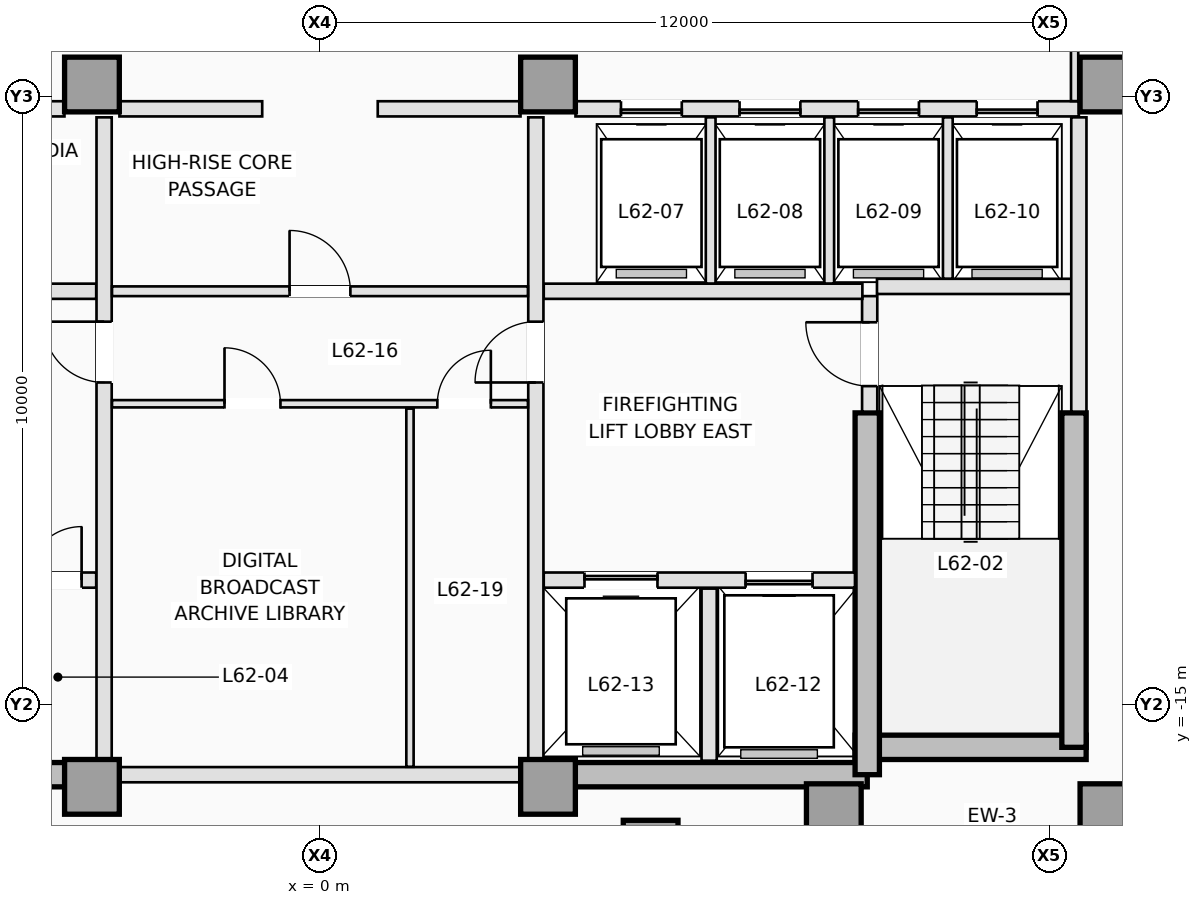
"""IFC4 building model, lengths in metres.
Left out: names, types, materials, properties, quantities, classifications, styles, units other than length and angle.
Written with IfcOpenShell. Run it as: python <this file> out.ifc"""

import sys

from ifc_helpers import new_model, si_unit, direction, frame, frame_2d, origin, origin_2d, place, context, subcontext, project, spatial, rectangle, extrude, element, fill, save


model = new_model("IFC4")
c1 = context("Model", 3, precision=1e-05, world=origin(), true_north=direction((0.0, 1.0)))
c2 = subcontext(c1, "Body", "Model", "MODEL_VIEW")
j1 = project(units=[si_unit("LENGTHUNIT", "METRE"), si_unit("PLANEANGLEUNIT", "RADIAN")], contexts=[c1])
p1 = place(None, origin())
s1 = spatial("IfcSite", under=j1, at=p1, CompositionType="ELEMENT")
p2 = place(p1, origin())
s2 = spatial("IfcBuilding", under=s1, at=p2, CompositionType="ELEMENT")
p3 = place(p2, frame((0.0, 0.0, 225.4)))
s3 = spatial("IfcBuildingStorey", under=s2, at=p3, CompositionType="ELEMENT", Elevation=225.4)
for number, where, z_axis, x_axis in (
    (1, (-9.0, -16.15, 0.0), (0.0, 0.0, 1.0), (1.0, 0.0, 0.0)),
    (2, (3.75, -16.15, 0.0), (0.0, 0.0, 1.0), (1.0, 0.0, 0.0)),
):
    element("IfcWall", number, at=place(p3, frame(where, z_axis=z_axis, x_axis=x_axis)), inside=s3, PredefinedType="SHEAR", context=c2, shape_type="SweptSolid", body=[
        extrude(rectangle(XDim=5.25, YDim=0.4, at=frame_2d((2.625, 0.0))), origin(), (0.0, 0.0, 1.0), 3.5),
    ])
p4 = place(p3, frame((8.8, -15.7, 0.0), z_axis=(0.0, 0.0, 1.0), x_axis=(1.0, 0.0, 0.0)))
e3 = element("IfcWall", 3, at=p4, inside=s3, PredefinedType="SHEAR", context=c2, shape_type="SweptSolid", body=[
    extrude(rectangle(XDim=3.8, YDim=0.4, at=frame_2d((1.9, 0.0))), origin(), (0.0, 0.0, 1.0), 3.5),
])
p5 = place(p3, frame((12.4, -15.7, 0.0), z_axis=(0.0, 0.0, 1.0), x_axis=(0.0, 1.0, 0.0)))
e4 = element("IfcWall", 4, at=p5, inside=s3, PredefinedType="SHEAR", context=c2, shape_type="SweptSolid", body=[
    extrude(rectangle(XDim=5.5, YDim=0.4, at=frame_2d((2.75, 0.0))), origin(), (0.0, 0.0, 1.0), 3.5),
])
p6 = place(p3, frame((9.0, -16.15, 0.0), z_axis=(0.0, 0.0, 1.0), x_axis=(0.0, 1.0, 0.0)))
e5 = element("IfcWall", 5, at=p6, inside=s3, PredefinedType="SHEAR", context=c2, shape_type="SweptSolid", body=[
    extrude(rectangle(XDim=5.95, YDim=0.4, at=frame_2d((2.975, 0.0))), origin(), (0.0, 0.0, 1.0), 3.5),
])
for number, where, z_axis, x_axis in (
    (6, (-3.75, -16.35, 0.0), (0.0, 0.0, 1.0), (1.0, 0.0, 0.0)),
    (7, (3.75, -16.35, 0.0), (0.0, 0.0, 1.0), (1.0, 0.0, 0.0)),
    (8, (8.45, -16.75, 0.0), (0.0, 0.0, 1.0), (1.0, 0.0, 0.0)),
    (9, (12.95, -16.75, 0.0), (0.0, 0.0, 1.0), (1.0, 0.0, 0.0)),
    (10, (-3.75, -4.8, 0.0), (0.0, 0.0, 1.0), (1.0, 0.0, 0.0)),
    (11, (3.75, -4.8, 0.0), (0.0, 0.0, 1.0), (1.0, 0.0, 0.0)),
    (12, (12.95, -4.8, 0.0), (0.0, 0.0, 1.0), (1.0, 0.0, 0.0)),
    (13, (5.438, -17.35, 0.0), (0.0, 0.0, 1.0), (0.0, 1.0, 0.0)),
):
    element("IfcColumn", number, at=place(p3, frame(where, z_axis=z_axis, x_axis=x_axis)), inside=s3, PredefinedType="COLUMN", context=c2, shape_type="SweptSolid", body=[
        extrude(rectangle(XDim=0.9, YDim=0.9, at=origin_2d()), origin(), (0.0, 0.0, 1.0), 3.5),
    ])
p7 = place(p3, frame((9.04, -10.18, 0.0), z_axis=(0.0, 0.0, 1.0), x_axis=(0.0, 1.0, 0.0)))
e14 = element("IfcWall", 14, at=p7, inside=s3, PredefinedType="PARTITIONING", context=c2, shape_type="SweptSolid", body=[
    extrude(rectangle(XDim=1.9, YDim=0.25, at=frame_2d((0.95, 0.0))), origin(), (0.0, 0.0, 1.0), 3.25),
])
p8 = place(p7, frame((0.42, 0.0, 0.0)))
e15 = element("IfcOpeningElement", 15, at=p8, cuts=e14, PredefinedType="OPENING", context=c2, shape_type="SweptSolid", body=[
    extrude(rectangle(XDim=1.05, YDim=2.15, at=frame_2d((0.525, 1.075))), frame((0.0, 0.135, 0.0), z_axis=(0.0, -1.0, 0.0), x_axis=(1.0, 0.0, 0.0)), (0.0, 0.0, 1.0), 0.27),
])
p9 = place(p3, frame((9.16, -8.12, 0.0), z_axis=(0.0, 0.0, 1.0), x_axis=(1.0, 0.0, 0.0)))
e16 = element("IfcWall", 16, at=p9, inside=s3, PredefinedType="PARTITIONING", context=c2, shape_type="SweptSolid", body=[
    extrude(rectangle(XDim=3.22, YDim=0.25, at=frame_2d((1.61, 0.0))), origin(), (0.0, 0.0, 1.0), 3.25),
])
p10 = place(p3, frame((12.48, -10.18, 0.0), z_axis=(0.0, 0.0, 1.0), x_axis=(0.0, 1.0, 0.0)))
e17 = element("IfcWall", 17, at=p10, inside=s3, PredefinedType="PARTITIONING", context=c2, shape_type="SweptSolid", body=[
    extrude(rectangle(XDim=4.84, YDim=0.25, at=frame_2d((2.42, 0.0))), origin(), (0.0, 0.0, 1.0), 3.25),
])
p11 = place(p3, frame((-8.798, -12.95, 0.0), z_axis=(0.0, 0.0, 1.0), x_axis=(1.0, 0.0, 0.0)))
e18 = element("IfcWall", 18, at=p11, inside=s3, PredefinedType="PARTITIONING", context=c2, shape_type="SweptSolid", body=[
    extrude(rectangle(XDim=5.118, YDim=0.25, at=frame_2d((2.559, 0.0))), origin(), (0.0, 0.0, 1.0), 3.25),
])
p12 = place(p11, frame((0.698, 0.0, 0.0)))
e19 = element("IfcOpeningElement", 19, at=p12, cuts=e18, PredefinedType="OPENING", context=c2, shape_type="SweptSolid", body=[
    extrude(rectangle(XDim=1.1, YDim=2.15, at=frame_2d((0.55, 1.075))), frame((0.0, 0.135, 0.0), z_axis=(0.0, -1.0, 0.0), x_axis=(1.0, 0.0, 0.0)), (0.0, 0.0, 1.0), 0.27),
])
p13 = place(p11, frame((2.598, 0.0, 0.0)))
e20 = element("IfcOpeningElement", 20, at=p13, cuts=e18, PredefinedType="OPENING", context=c2, shape_type="SweptSolid", body=[
    extrude(rectangle(XDim=0.88, YDim=2.1, at=frame_2d((0.44, 1.05))), frame((0.0, 0.135, 0.0), z_axis=(0.0, -1.0, 0.0), x_axis=(1.0, 0.0, 0.0)), (0.0, 0.0, 1.0), 0.27),
])
p14 = place(p11, frame((3.998, 0.0, 0.0)))
e21 = element("IfcOpeningElement", 21, at=p14, cuts=e18, PredefinedType="OPENING", context=c2, shape_type="SweptSolid", body=[
    extrude(rectangle(XDim=0.88, YDim=2.1, at=frame_2d((0.44, 1.05))), frame((0.0, 0.135, 0.0), z_axis=(0.0, -1.0, 0.0), x_axis=(1.0, 0.0, 0.0)), (0.0, 0.0, 1.0), 0.27),
])
p15 = place(p3, frame((3.68, -12.95, 0.0), z_axis=(0.0, 0.0, 1.0), x_axis=(1.0, 0.0, 0.0)))
e22 = element("IfcWall", 22, at=p15, inside=s3, PredefinedType="PARTITIONING", context=c2, shape_type="SweptSolid", body=[
    extrude(rectangle(XDim=5.118, YDim=0.25, at=frame_2d((2.559, 0.0))), origin(), (0.0, 0.0, 1.0), 3.25),
])
p16 = place(p15, frame((3.32, 0.0, 0.0)))
e23 = element("IfcOpeningElement", 23, at=p16, cuts=e22, PredefinedType="OPENING", context=c2, shape_type="SweptSolid", body=[
    extrude(rectangle(XDim=1.1, YDim=2.15, at=frame_2d((0.55, 1.075))), frame((0.0, 0.135, 0.0), z_axis=(0.0, -1.0, 0.0), x_axis=(1.0, 0.0, 0.0)), (0.0, 0.0, 1.0), 0.27),
])
p17 = place(p15, frame((0.67, 0.0, 0.0)))
e24 = element("IfcOpeningElement", 24, at=p17, cuts=e22, PredefinedType="OPENING", context=c2, shape_type="SweptSolid", body=[
    extrude(rectangle(XDim=1.2, YDim=2.15, at=frame_2d((0.6, 1.075))), frame((0.0, 0.135, 0.0), z_axis=(0.0, -1.0, 0.0), x_axis=(1.0, 0.0, 0.0)), (0.0, 0.0, 1.0), 0.27),
])
p18 = place(p3, frame((6.4, -15.92, 0.0), z_axis=(0.0, 0.0, 1.0), x_axis=(0.0, 1.0, 0.0)))
e25 = element("IfcWall", 25, at=p18, inside=s3, PredefinedType="PARTITIONING", context=c2, shape_type="SweptSolid", body=[
    extrude(rectangle(XDim=2.83, YDim=0.25, at=frame_2d((1.415, 0.0))), origin(), (0.0, 0.0, 1.0), 3.25),
])
for number, where, z_axis, x_axis in (
    (26, (-8.92, -8.2, 0.0), (0.0, 0.0, 1.0), (1.0, 0.0, 0.0)),
    (27, (3.68, -8.2, 0.0), (0.0, 0.0, 1.0), (1.0, 0.0, 0.0)),
):
    element("IfcWall", number, at=place(p3, frame(where, z_axis=z_axis, x_axis=x_axis)), inside=s3, PredefinedType="PARTITIONING", context=c2, shape_type="SweptSolid", body=[
        extrude(rectangle(XDim=5.24, YDim=0.25, at=frame_2d((2.62, 0.0))), origin(), (0.0, 0.0, 1.0), 3.25),
    ])
p19 = place(p3, frame((-3.55, -15.898, 0.0), z_axis=(0.0, 0.0, 1.0), x_axis=(0.0, 1.0, 0.0)))
e28 = element("IfcWall", 28, at=p19, inside=s3, PredefinedType="PARTITIONING", context=c2, shape_type="SweptSolid", body=[
    extrude(rectangle(XDim=10.558, YDim=0.25, at=frame_2d((5.279, 0.0))), origin(), (0.0, 0.0, 1.0), 3.25),
])
p20 = place(p19, frame((6.198, 0.0, 0.0)))
e29 = element("IfcOpeningElement", 29, at=p20, cuts=e28, PredefinedType="OPENING", context=c2, shape_type="SweptSolid", body=[
    extrude(rectangle(XDim=1.0, YDim=2.15, at=frame_2d((0.5, 1.075))), frame((0.0, 0.135, 0.0), z_axis=(0.0, -1.0, 0.0), x_axis=(1.0, 0.0, 0.0)), (0.0, 0.0, 1.0), 0.27),
])
p21 = place(p3, frame((3.55, -15.898, 0.0), z_axis=(0.0, 0.0, 1.0), x_axis=(0.0, 1.0, 0.0)))
e30 = element("IfcWall", 30, at=p21, inside=s3, PredefinedType="PARTITIONING", context=c2, shape_type="SweptSolid", body=[
    extrude(rectangle(XDim=10.558, YDim=0.25, at=frame_2d((5.279, 0.0))), origin(), (0.0, 0.0, 1.0), 3.25),
])
p22 = place(p21, frame((6.198, 0.0, 0.0)))
e31 = element("IfcOpeningElement", 31, at=p22, cuts=e30, PredefinedType="OPENING", context=c2, shape_type="SweptSolid", body=[
    extrude(rectangle(XDim=1.0, YDim=2.15, at=frame_2d((0.5, 1.075))), frame((0.0, 0.135, 0.0), z_axis=(0.0, -1.0, 0.0), x_axis=(1.0, 0.0, 0.0)), (0.0, 0.0, 1.0), 0.27),
])
p23 = place(p3, frame((-12.48, -5.2, 0.0), z_axis=(0.0, 0.0, 1.0), x_axis=(1.0, 0.0, 0.0)))
e32 = element("IfcWall", 32, at=p23, inside=s3, PredefinedType="PARTITIONING", context=c2, shape_type="SweptSolid", body=[
    extrude(rectangle(XDim=8.278, YDim=0.25, at=frame_2d((4.139, 0.0))), origin(), (0.0, 0.0, 1.0), 3.25),
])
p24 = place(p23, frame((3.05, 0.0, 0.0)))
e33 = element("IfcOpeningElement", 33, at=p24, cuts=e32, PredefinedType="OPENING", context=c2, shape_type="SweptSolid", body=[
    extrude(rectangle(XDim=0.92, YDim=2.12, at=frame_2d((0.46, 1.06))), frame((0.0, 0.135, 0.0), z_axis=(0.0, -1.0, 0.0), x_axis=(1.0, 0.0, 0.0)), (0.0, 0.0, 1.0), 0.27),
])
p25 = place(p23, frame((6.15, 0.0, 0.0)))
e34 = element("IfcOpeningElement", 34, at=p25, cuts=e32, PredefinedType="OPENING", context=c2, shape_type="SweptSolid", body=[
    extrude(rectangle(XDim=0.92, YDim=2.12, at=frame_2d((0.46, 1.06))), frame((0.0, 0.135, 0.0), z_axis=(0.0, -1.0, 0.0), x_axis=(1.0, 0.0, 0.0)), (0.0, 0.0, 1.0), 0.27),
])
p26 = place(p3, frame((4.202, -5.2, 0.0), z_axis=(0.0, 0.0, 1.0), x_axis=(1.0, 0.0, 0.0)))
e35 = element("IfcWall", 35, at=p26, inside=s3, PredefinedType="PARTITIONING", context=c2, shape_type="SweptSolid", body=[
    extrude(rectangle(XDim=8.278, YDim=0.25, at=frame_2d((4.139, 0.0))), origin(), (0.0, 0.0, 1.0), 3.25),
])
p27 = place(p26, frame((0.748, 0.0, 0.0)))
e36 = element("IfcOpeningElement", 36, at=p27, cuts=e35, PredefinedType="OPENING", context=c2, shape_type="SweptSolid", body=[
    extrude(rectangle(XDim=1.0, YDim=2.15, at=frame_2d((0.5, 1.075))), frame((0.0, 0.135, 0.0), z_axis=(0.0, -1.0, 0.0), x_axis=(1.0, 0.0, 0.0)), (0.0, 0.0, 1.0), 0.27),
])
p28 = place(p26, frame((2.698, 0.0, 0.0)))
e37 = element("IfcOpeningElement", 37, at=p28, cuts=e35, PredefinedType="OPENING", context=c2, shape_type="SweptSolid", body=[
    extrude(rectangle(XDim=1.0, YDim=2.15, at=frame_2d((0.5, 1.075))), frame((0.0, 0.135, 0.0), z_axis=(0.0, -1.0, 0.0), x_axis=(1.0, 0.0, 0.0)), (0.0, 0.0, 1.0), 0.27),
])
p29 = place(p26, frame((4.648, 0.0, 0.0)))
e38 = element("IfcOpeningElement", 38, at=p29, cuts=e35, PredefinedType="OPENING", context=c2, shape_type="SweptSolid", body=[
    extrude(rectangle(XDim=1.0, YDim=2.15, at=frame_2d((0.5, 1.075))), frame((0.0, 0.135, 0.0), z_axis=(0.0, -1.0, 0.0), x_axis=(1.0, 0.0, 0.0)), (0.0, 0.0, 1.0), 0.27),
])
p30 = place(p26, frame((6.598, 0.0, 0.0)))
e39 = element("IfcOpeningElement", 39, at=p30, cuts=e35, PredefinedType="OPENING", context=c2, shape_type="SweptSolid", body=[
    extrude(rectangle(XDim=1.0, YDim=2.15, at=frame_2d((0.5, 1.075))), frame((0.0, 0.135, 0.0), z_axis=(0.0, -1.0, 0.0), x_axis=(1.0, 0.0, 0.0)), (0.0, 0.0, 1.0), 0.27),
])
for number, where, z_axis, x_axis in (
    (40, (-3.298, -5.2, 0.0), (0.0, 0.0, 1.0), (1.0, 0.0, 0.0)),
    (41, (0.95, -5.2, 0.0), (0.0, 0.0, 1.0), (1.0, 0.0, 0.0)),
):
    element("IfcWall", number, at=place(p3, frame(where, z_axis=z_axis, x_axis=x_axis)), inside=s3, PredefinedType="PARTITIONING", context=c2, shape_type="SweptSolid", body=[
        extrude(rectangle(XDim=2.348, YDim=0.25, at=frame_2d((1.174, 0.0))), origin(), (0.0, 0.0, 1.0), 3.25),
    ])
for number, where, z_axis, x_axis in (
    (42, (6.425, -8.073, 0.0), (0.0, 0.0, 1.0), (0.0, 1.0, 0.0)),
    (43, (8.375, -8.073, 0.0), (0.0, 0.0, 1.0), (0.0, 1.0, 0.0)),
):
    element("IfcWall", number, at=place(p3, frame(where, z_axis=z_axis, x_axis=x_axis)), inside=s3, PredefinedType="PARTITIONING", context=c2, shape_type="SweptSolid", body=[
        extrude(rectangle(XDim=2.733, YDim=0.16, at=frame_2d((1.366, 0.0))), origin(), (0.0, 0.0, 1.0), 3.25),
    ])
p31 = place(p3, frame((10.325, -7.993, 0.0), z_axis=(0.0, 0.0, 1.0), x_axis=(0.0, 1.0, 0.0)))
e44 = element("IfcWall", 44, at=p31, inside=s3, PredefinedType="PARTITIONING", context=c2, shape_type="SweptSolid", body=[
    extrude(rectangle(XDim=2.653, YDim=0.16, at=frame_2d((1.326, 0.0))), origin(), (0.0, 0.0, 1.0), 3.25),
])
p32 = place(p3, frame((-3.298, -16.15, 0.0), z_axis=(0.0, 0.0, 1.0), x_axis=(1.0, 0.0, 0.0)))
e45 = element("IfcWall", 45, at=p32, inside=s3, PredefinedType="PARTITIONING", context=c2, shape_type="SweptSolid", body=[
    extrude(rectangle(XDim=6.596, YDim=0.25, at=frame_2d((3.298, 0.0))), origin(), (0.0, 0.0, 1.0), 2.45),
])
p33 = place(p3, frame((-3.42, -8.2, 0.0), z_axis=(0.0, 0.0, 1.0), x_axis=(1.0, 0.0, 0.0)))
e46 = element("IfcWall", 46, at=p33, inside=s3, PredefinedType="PARTITIONING", context=c2, shape_type="SweptSolid", body=[
    extrude(rectangle(XDim=6.84, YDim=0.16, at=frame_2d((3.42, 0.0))), origin(), (0.0, 0.0, 1.0), 3.25),
])
p34 = place(p33, frame((2.92, 0.0, 0.0)))
e47 = element("IfcOpeningElement", 47, at=p34, cuts=e46, PredefinedType="OPENING", context=c2, shape_type="SweptSolid", body=[
    extrude(rectangle(XDim=1.0, YDim=2.15, at=frame_2d((0.5, 1.075))), frame((0.0, 0.09, 0.0), z_axis=(0.0, -1.0, 0.0), x_axis=(1.0, 0.0, 0.0)), (0.0, 0.0, 1.0), 0.18),
])
p35 = place(p3, frame((-3.42, -10.05, 0.0), z_axis=(0.0, 0.0, 1.0), x_axis=(1.0, 0.0, 0.0)))
e48 = element("IfcWall", 48, at=p35, inside=s3, PredefinedType="PARTITIONING", context=c2, shape_type="SweptSolid", body=[
    extrude(rectangle(XDim=6.84, YDim=0.12, at=frame_2d((3.42, 0.0))), origin(), (0.0, 0.0, 1.0), 3.25),
])
p36 = place(p35, frame((1.85, 0.0, 0.0)))
e49 = element("IfcOpeningElement", 49, at=p36, cuts=e48, PredefinedType="OPENING", context=c2, shape_type="SweptSolid", body=[
    extrude(rectangle(XDim=0.92, YDim=2.12, at=frame_2d((0.46, 1.06))), frame((0.0, 0.07, 0.0), z_axis=(0.0, -1.0, 0.0), x_axis=(1.0, 0.0, 0.0)), (0.0, 0.0, 1.0), 0.14),
])
p37 = place(p35, frame((5.35, 0.0, 0.0)))
e50 = element("IfcOpeningElement", 50, at=p37, cuts=e48, PredefinedType="OPENING", context=c2, shape_type="SweptSolid", body=[
    extrude(rectangle(XDim=0.88, YDim=2.12, at=frame_2d((0.44, 1.06))), frame((0.0, 0.07, 0.0), z_axis=(0.0, -1.0, 0.0), x_axis=(1.0, 0.0, 0.0)), (0.0, 0.0, 1.0), 0.14),
])
p38 = place(p3, frame((1.48, -16.02, 0.0), z_axis=(0.0, 0.0, 1.0), x_axis=(0.0, 1.0, 0.0)))
e51 = element("IfcWall", 51, at=p38, inside=s3, PredefinedType="PARTITIONING", context=c2, shape_type="SweptSolid", body=[
    extrude(rectangle(XDim=5.89, YDim=0.12, at=frame_2d((2.945, 0.0))), origin(), (0.0, 0.0, 1.0), 3.25),
])
p39 = place(p3, frame((12.41, -2.462, 0.0), z_axis=(0.0, 0.0, 1.0), x_axis=(0.0, -1.0, 0.0)))
e52 = element("IfcWall", 52, at=p39, inside=s3, PredefinedType="PARTITIONING", context=c2, shape_type="SweptSolid", body=[
    extrude(rectangle(XDim=2.611, YDim=0.12, at=frame_2d((1.306, 0.0))), origin(), (0.0, 0.0, 1.0), 3.25),
])
p40 = place(p27, origin())
e53 = element("IfcDoor", 53, at=p40, inside=s3, OperationType="SLIDING_TO_RIGHT", PredefinedType="DOOR", context=c2, shape_type="SweptSolid", body=[
    extrude(rectangle(XDim=1.0, YDim=2.15, at=frame_2d((0.5, 1.075))), frame((0.0, 0.025, 0.0), z_axis=(0.0, -1.0, 0.0), x_axis=(1.0, 0.0, 0.0)), (0.0, 0.0, 1.0), 0.05),
])
fill(e36, e53)
p41 = place(p28, origin())
e54 = element("IfcDoor", 54, at=p41, inside=s3, OperationType="SLIDING_TO_RIGHT", PredefinedType="DOOR", context=c2, shape_type="SweptSolid", body=[
    extrude(rectangle(XDim=1.0, YDim=2.15, at=frame_2d((0.5, 1.075))), frame((0.0, 0.025, 0.0), z_axis=(0.0, -1.0, 0.0), x_axis=(1.0, 0.0, 0.0)), (0.0, 0.0, 1.0), 0.05),
])
fill(e37, e54)
p42 = place(p29, origin())
e55 = element("IfcDoor", 55, at=p42, inside=s3, OperationType="SLIDING_TO_RIGHT", PredefinedType="DOOR", context=c2, shape_type="SweptSolid", body=[
    extrude(rectangle(XDim=1.0, YDim=2.15, at=frame_2d((0.5, 1.075))), frame((0.0, 0.025, 0.0), z_axis=(0.0, -1.0, 0.0), x_axis=(1.0, 0.0, 0.0)), (0.0, 0.0, 1.0), 0.05),
])
fill(e38, e55)
p43 = place(p30, origin())
e56 = element("IfcDoor", 56, at=p43, inside=s3, OperationType="SLIDING_TO_RIGHT", PredefinedType="DOOR", context=c2, shape_type="SweptSolid", body=[
    extrude(rectangle(XDim=1.0, YDim=2.15, at=frame_2d((0.5, 1.075))), frame((0.0, 0.025, 0.0), z_axis=(0.0, -1.0, 0.0), x_axis=(1.0, 0.0, 0.0)), (0.0, 0.0, 1.0), 0.05),
])
fill(e39, e56)
p44 = place(p16, origin())
e57 = element("IfcDoor", 57, at=p44, inside=s3, OperationType="SLIDING_TO_RIGHT", PredefinedType="DOOR", context=c2, shape_type="SweptSolid", body=[
    extrude(rectangle(XDim=1.1, YDim=2.15, at=frame_2d((0.55, 1.075))), frame((0.0, 0.025, 0.0), z_axis=(0.0, -1.0, 0.0), x_axis=(1.0, 0.0, 0.0)), (0.0, 0.0, 1.0), 0.05),
])
fill(e23, e57)
p45 = place(p17, origin())
e58 = element("IfcDoor", 58, at=p45, inside=s3, OperationType="SLIDING_TO_LEFT", PredefinedType="DOOR", context=c2, shape_type="SweptSolid", body=[
    extrude(rectangle(XDim=1.2, YDim=2.15, at=frame_2d((0.6, 1.075))), frame((0.0, 0.025, 0.0), z_axis=(0.0, -1.0, 0.0), x_axis=(1.0, 0.0, 0.0)), (0.0, 0.0, 1.0), 0.05),
])
fill(e24, e58)
p46 = place(p8, origin())
e59 = element("IfcDoor", 59, at=p46, inside=s3, OperationType="SINGLE_SWING_RIGHT", PredefinedType="DOOR", context=c2, shape_type="SweptSolid", body=[
    extrude(rectangle(XDim=1.05, YDim=2.15, at=frame_2d((0.525, 1.075))), frame((0.0, 0.025, 0.0), z_axis=(0.0, -1.0, 0.0), x_axis=(1.0, 0.0, 0.0)), (0.0, 0.0, 1.0), 0.05),
])
fill(e15, e59)
p47 = place(p14, origin())
e60 = element("IfcDoor", 60, at=p47, inside=s3, OperationType="SINGLE_SWING_RIGHT", PredefinedType="TRAPDOOR", context=c2, shape_type="SweptSolid", body=[
    extrude(rectangle(XDim=0.88, YDim=2.1, at=frame_2d((0.44, 1.05))), frame((0.0, 0.025, 0.0), z_axis=(0.0, -1.0, 0.0), x_axis=(1.0, 0.0, 0.0)), (0.0, 0.0, 1.0), 0.05),
])
fill(e21, e60)
p48 = place(p20, origin())
e61 = element("IfcDoor", 61, at=p48, inside=s3, OperationType="SINGLE_SWING_RIGHT", PredefinedType="DOOR", context=c2, shape_type="SweptSolid", body=[
    extrude(rectangle(XDim=1.0, YDim=2.15, at=frame_2d((0.5, 1.075))), frame((0.0, 0.025, 0.0), z_axis=(0.0, -1.0, 0.0), x_axis=(1.0, 0.0, 0.0)), (0.0, 0.0, 1.0), 0.05),
])
fill(e29, e61)
p49 = place(p22, origin())
e62 = element("IfcDoor", 62, at=p49, inside=s3, OperationType="SINGLE_SWING_LEFT", PredefinedType="DOOR", context=c2, shape_type="SweptSolid", body=[
    extrude(rectangle(XDim=1.0, YDim=2.15, at=frame_2d((0.5, 1.075))), frame((0.0, 0.025, 0.0), z_axis=(0.0, -1.0, 0.0), x_axis=(1.0, 0.0, 0.0)), (0.0, 0.0, 1.0), 0.05),
])
fill(e31, e62)
p50 = place(p34, origin())
e63 = element("IfcDoor", 63, at=p50, inside=s3, OperationType="SINGLE_SWING_LEFT", PredefinedType="DOOR", context=c2, shape_type="SweptSolid", body=[
    extrude(rectangle(XDim=1.0, YDim=2.15, at=frame_2d((0.5, 1.075))), frame((0.0, 0.025, 0.0), z_axis=(0.0, -1.0, 0.0), x_axis=(1.0, 0.0, 0.0)), (0.0, 0.0, 1.0), 0.05),
])
fill(e47, e63)
p51 = place(p36, origin())
e64 = element("IfcDoor", 64, at=p51, inside=s3, OperationType="SINGLE_SWING_LEFT", PredefinedType="DOOR", context=c2, shape_type="SweptSolid", body=[
    extrude(rectangle(XDim=0.92, YDim=2.12, at=frame_2d((0.46, 1.06))), frame((0.0, 0.025, 0.0), z_axis=(0.0, -1.0, 0.0), x_axis=(1.0, 0.0, 0.0)), (0.0, 0.0, 1.0), 0.05),
])
fill(e49, e64)
p52 = place(p37, origin())
e65 = element("IfcDoor", 65, at=p52, inside=s3, OperationType="SINGLE_SWING_RIGHT", PredefinedType="DOOR", context=c2, shape_type="SweptSolid", body=[
    extrude(rectangle(XDim=0.88, YDim=2.12, at=frame_2d((0.44, 1.06))), frame((0.0, 0.025, 0.0), z_axis=(0.0, -1.0, 0.0), x_axis=(1.0, 0.0, 0.0)), (0.0, 0.0, 1.0), 0.05),
])
fill(e50, e65)
save(model, sys.argv[1])
